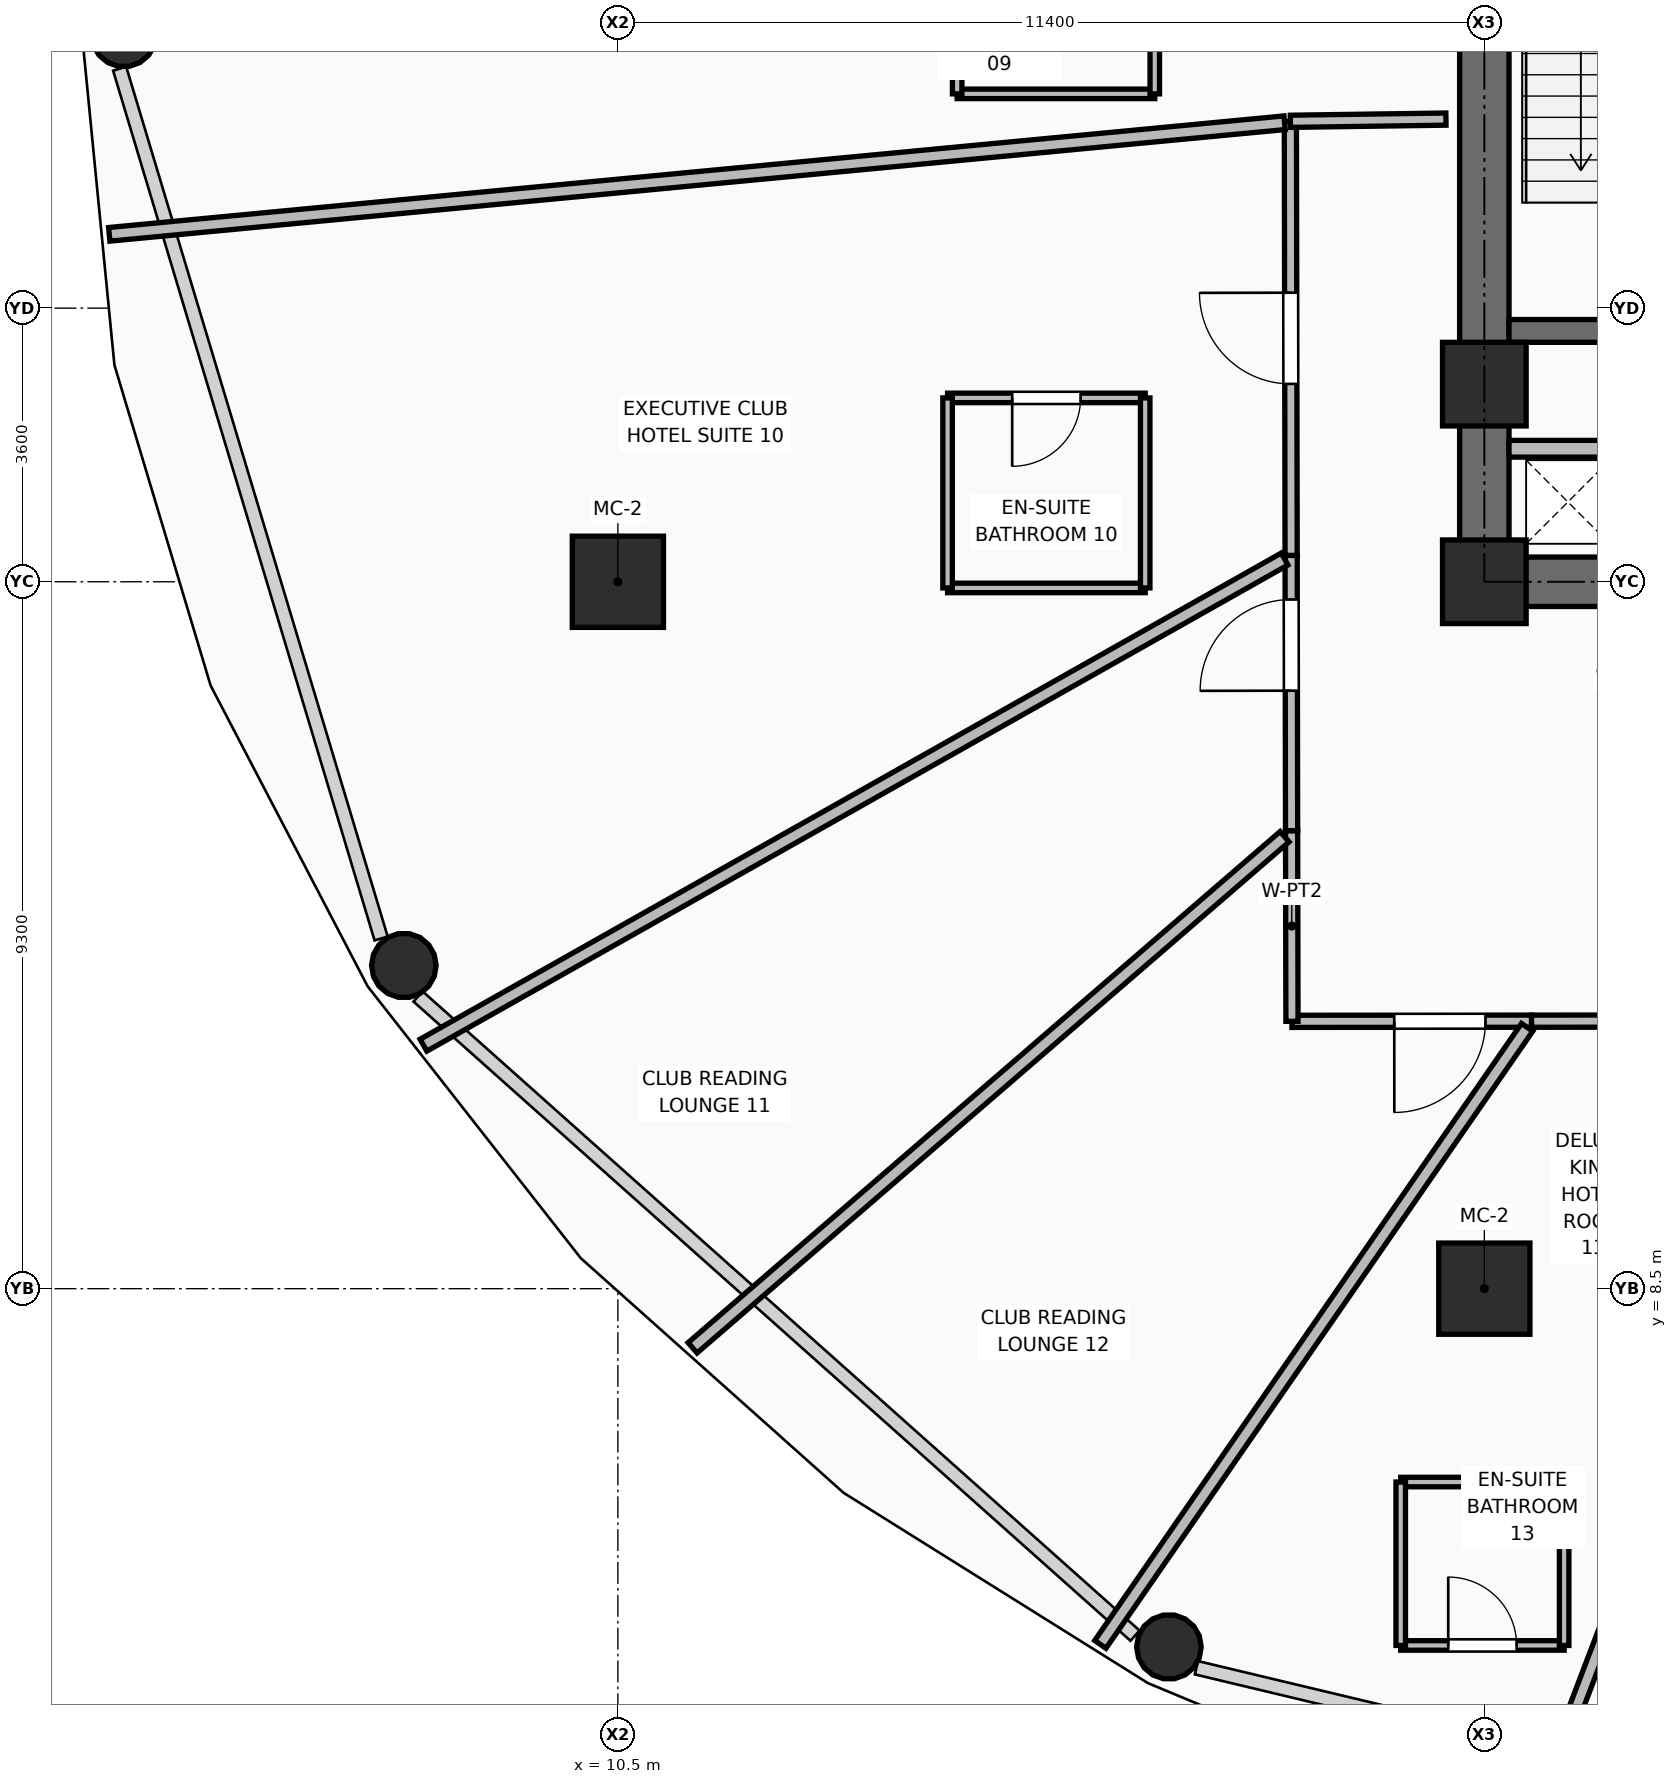
"""IFC4 building model, lengths in metres.
Left out: names, types, materials, properties, quantities, classifications, styles, units other than length and angle.
Written with IfcOpenShell. Run it as: python <this file> out.ifc"""

import sys

from ifc_helpers import new_model, si_unit, direction, frame, frame_2d, origin, origin_2d, place, context, subcontext, project, spatial, rectangle, hollow_rectangle, hollow_circle, extrude, element, fill, save


model = new_model("IFC4")
c1 = context("Model", 3, precision=1e-05, world=origin(), true_north=direction((0.0, 1.0)))
c2 = subcontext(c1, "Body", "Model", "MODEL_VIEW")
j1 = project(units=[si_unit("LENGTHUNIT", "METRE"), si_unit("PLANEANGLEUNIT", "RADIAN")], contexts=[c1])
p1 = place(None, origin())
s1 = spatial("IfcSite", under=j1, at=p1, CompositionType="ELEMENT")
p2 = place(p1, origin())
s2 = spatial("IfcBuilding", under=s1, at=p2, CompositionType="ELEMENT")
p3 = place(p2, frame((0.0, 0.0, 79.5)))
s3 = spatial("IfcBuildingStorey", under=s2, at=p3, CompositionType="ELEMENT", Elevation=79.5)
for number, where, z_axis, x_axis in (
    (1, (21.9, 17.8, 0.0), (0.0, 0.0, 1.0), (1.0, 0.0, 0.0)),
    (2, (21.9, 20.4, 0.0), (0.0, 0.0, 1.0), (1.0, 0.0, 0.0)),
):
    element("IfcColumn", number, at=place(p3, frame(where, z_axis=z_axis, x_axis=x_axis)), inside=s3, PredefinedType="COLUMN", context=c2, shape_type="SweptSolid", body=[
        extrude(rectangle(XDim=1.1, YDim=1.1, at=origin_2d()), origin(), (0.0, 0.0, 1.0), 3.75),
    ])
for number, where, z_axis, x_axis in (
    (3, (21.9, 8.5, 0.0), (0.0, 0.0, 1.0), (1.0, 0.0, 0.0)),
    (4, (10.5, 17.8, 0.0), (0.0, 0.0, 1.0), (1.0, 0.0, 0.0)),
):
    element("IfcColumn", number, at=place(p3, frame(where, z_axis=z_axis, x_axis=x_axis)), inside=s3, PredefinedType="COLUMN", context=c2, shape_type="SweptSolid", body=[
        extrude(hollow_rectangle(XDim=1.2, YDim=1.2, WallThickness=0.045, at=origin_2d()), origin(), (0.0, 0.0, 1.0), 3.75),
    ])
for number, where, z_axis, x_axis in (
    (5, (4.0, 25.0, 0.0), (0.0, 0.0, 1.0), (1.0, 0.0, 0.0)),
    (6, (7.684, 12.752, 0.0), (0.0, 0.0, 1.0), (1.0, 0.0, 0.0)),
    (7, (17.75, 3.787, 0.0), (0.0, 0.0, 1.0), (1.0, 0.0, 0.0)),
):
    element("IfcColumn", number, at=place(p3, frame(where, z_axis=z_axis, x_axis=x_axis)), inside=s3, PredefinedType="COLUMN", context=c2, shape_type="SweptSolid", body=[
        extrude(hollow_circle(Radius=0.425, WallThickness=0.04, at=origin_2d()), origin(), (0.0, 0.0, 1.0), 3.57),
    ])
p4 = place(p3, frame((21.575, 17.8, 0.0), z_axis=(0.0, 0.0, 1.0), x_axis=(1.0, 0.0, 0.0)))
e8 = element("IfcWall", 8, at=p4, inside=s3, PredefinedType="SHEAR", context=c2, shape_type="SweptSolid", body=[
    extrude(rectangle(XDim=2.175, YDim=0.65, at=frame_2d((1.087, 0.0))), origin(), (0.0, 0.0, 1.0), 3.57),
])
p5 = place(p3, frame((21.9, 18.125, 0.0), z_axis=(0.0, 0.0, 1.0), x_axis=(0.0, 1.0, 0.0)))
e9 = element("IfcWall", 9, at=p5, inside=s3, PredefinedType="SHEAR", context=c2, shape_type="SweptSolid", body=[
    extrude(rectangle(XDim=14.0, YDim=0.65, at=frame_2d((7.0, 0.0))), origin(), (0.0, 0.0, 1.0), 3.57),
])
p6 = place(p3, frame((22.225, 21.1, 0.0), z_axis=(0.0, 0.0, 1.0), x_axis=(1.0, 0.0, 0.0)))
e10 = element("IfcWall", 10, at=p6, inside=s3, PredefinedType="SHEAR", context=c2, shape_type="SweptSolid", body=[
    extrude(rectangle(XDim=3.515, YDim=0.3, at=frame_2d((1.757, 0.0))), origin(), (0.0, 0.0, 1.0), 3.57),
])
p7 = place(p6, frame((1.995, 0.0, 0.0)))
e11 = element("IfcOpeningElement", 11, at=p7, cuts=e10, PredefinedType="OPENING", context=c2, shape_type="SweptSolid", body=[
    extrude(rectangle(XDim=1.05, YDim=2.1, at=frame_2d((0.525, 1.05))), frame((0.0, 0.16, 0.0), z_axis=(0.0, -1.0, 0.0), x_axis=(1.0, 0.0, 0.0)), (0.0, 0.0, 1.0), 0.32),
])
p8 = place(p3, frame((22.225, 19.55, 0.0), z_axis=(0.0, 0.0, 1.0), x_axis=(1.0, 0.0, 0.0)))
e12 = element("IfcWall", 12, at=p8, inside=s3, PredefinedType="PARTITIONING", context=c2, shape_type="SweptSolid", body=[
    extrude(rectangle(XDim=1.565, YDim=0.22, at=frame_2d((0.782, 0.0))), origin(), (0.0, 0.0, 1.0), 2.595),
])
p9 = place(p3, frame((26.552, 12.022, 0.0), z_axis=(0.0, 0.0, 1.0), x_axis=(-0.999999736017, -0.000726611979, 0.0)))
e13 = element("IfcWall", 13, at=p9, inside=s3, PredefinedType="PARTITIONING", context=c2, shape_type="SweptSolid", body=[
    extrude(rectangle(XDim=4.032, YDim=0.16, at=frame_2d((2.016, 0.0))), origin(), (0.0, 0.0, 1.0), 3.55),
])
p10 = place(p9, frame((1.587, 0.0, 0.0)))
e14 = element("IfcOpeningElement", 14, at=p10, cuts=e13, PredefinedType="OPENING", context=c2, shape_type="SweptSolid", body=[
    extrude(rectangle(XDim=1.0, YDim=2.1, at=frame_2d((0.5, 1.05))), frame((0.0, 0.09, 0.0), z_axis=(0.0, -1.0, 0.0), x_axis=(1.0, 0.0, 0.0)), (0.0, 0.0, 1.0), 0.18),
])
p11 = place(p3, frame((22.52, 12.019, 0.0), z_axis=(0.0, 0.0, 1.0), x_axis=(-0.999999807912, -0.000619818584, 0.0)))
e15 = element("IfcWall", 15, at=p11, inside=s3, PredefinedType="PARTITIONING", context=c2, shape_type="SweptSolid", body=[
    extrude(rectangle(XDim=3.151, YDim=0.16, at=frame_2d((1.576, 0.0))), origin(), (0.0, 0.0, 1.0), 2.928),
])
p12 = place(p11, frame((0.605, 0.0, 0.0)))
e16 = element("IfcOpeningElement", 16, at=p12, cuts=e15, PredefinedType="OPENING", context=c2, shape_type="SweptSolid", body=[
    extrude(rectangle(XDim=1.2, YDim=2.1, at=frame_2d((0.6, 1.05))), frame((0.0, 0.09, 0.0), z_axis=(0.0, -1.0, 0.0), x_axis=(1.0, 0.0, 0.0)), (0.0, 0.0, 1.0), 0.18),
])
p13 = place(p3, frame((19.369, 12.017, 0.0), z_axis=(0.0, 0.0, 1.0), x_axis=(-0.001947036808, 0.999998104522, 0.0)))
e17 = element("IfcWall", 17, at=p13, inside=s3, PredefinedType="PARTITIONING", context=c2, shape_type="SweptSolid", body=[
    extrude(rectangle(XDim=2.508, YDim=0.16, at=frame_2d((1.254, 0.0))), origin(), (0.0, 0.0, 1.0), 3.55),
])
p14 = place(p3, frame((19.364, 14.525, 0.0), z_axis=(0.0, 0.0, 1.0), x_axis=(-0.001685087928, 0.999998580238, 0.0)))
e18 = element("IfcWall", 18, at=p14, inside=s3, PredefinedType="PARTITIONING", context=c2, shape_type="SweptSolid", body=[
    extrude(rectangle(XDim=3.622, YDim=0.16, at=frame_2d((1.811, 0.0))), origin(), (0.0, 0.0, 1.0), 2.928),
])
p15 = place(p14, frame((1.842, 0.0, 0.0)))
e19 = element("IfcOpeningElement", 19, at=p15, cuts=e18, PredefinedType="OPENING", context=c2, shape_type="SweptSolid", body=[
    extrude(rectangle(XDim=1.2, YDim=2.1, at=frame_2d((0.6, 1.05))), frame((0.0, 0.09, 0.0), z_axis=(0.0, -1.0, 0.0), x_axis=(1.0, 0.0, 0.0)), (0.0, 0.0, 1.0), 0.18),
])
p16 = place(p3, frame((19.358, 18.147, 0.0), z_axis=(0.0, 0.0, 1.0), x_axis=(-0.001752733286, 0.999998463962, 0.0)))
e20 = element("IfcWall", 20, at=p16, inside=s3, PredefinedType="PARTITIONING", context=c2, shape_type="SweptSolid", body=[
    extrude(rectangle(XDim=5.711, YDim=0.16, at=frame_2d((2.855, 0.0))), origin(), (0.0, 0.0, 1.0), 2.928),
])
p17 = place(p16, frame((2.256, 0.0, 0.0)))
e21 = element("IfcOpeningElement", 21, at=p17, cuts=e20, PredefinedType="OPENING", context=c2, shape_type="SweptSolid", body=[
    extrude(rectangle(XDim=1.2, YDim=2.1, at=frame_2d((0.6, 1.05))), frame((0.0, 0.09, 0.0), z_axis=(0.0, -1.0, 0.0), x_axis=(1.0, 0.0, 0.0)), (0.0, 0.0, 1.0), 0.18),
])
p18 = place(p3, frame((19.348, 23.858, 0.0), z_axis=(0.0, 0.0, 1.0), x_axis=(0.999899308643, 0.014190580528, 0.0)))
e22 = element("IfcWall", 22, at=p18, inside=s3, PredefinedType="PARTITIONING", context=c2, shape_type="SweptSolid", body=[
    extrude(rectangle(XDim=2.047, YDim=0.16, at=frame_2d((1.024, 0.0))), origin(), (0.0, 0.0, 1.0), 3.55),
])
p19 = place(p3, frame((19.272, 23.839, 0.0), z_axis=(0.0, 0.0, 1.0), x_axis=(-0.995524176843, -0.094507213062, 0.0)))
e23 = element("IfcWall", 23, at=p19, inside=s3, PredefinedType="PARTITIONING", context=c2, shape_type="SweptSolid", body=[
    extrude(rectangle(XDim=15.533, YDim=0.18, at=frame_2d((7.767, 0.0))), origin(), (0.0, 0.0, 1.0), 2.775),
])
p20 = place(p3, frame((19.272, 18.099, 0.0), z_axis=(0.0, 0.0, 1.0), x_axis=(-0.870816794363, -0.491607679614, 0.0)))
e24 = element("IfcWall", 24, at=p20, inside=s3, PredefinedType="PARTITIONING", context=c2, shape_type="SweptSolid", body=[
    extrude(rectangle(XDim=13.011, YDim=0.18, at=frame_2d((6.505, 0.0))), origin(), (0.0, 0.0, 1.0), 2.775),
])
p21 = place(p3, frame((19.272, 14.446, 0.0), z_axis=(0.0, 0.0, 1.0), x_axis=(-0.756957430289, -0.653464190855, 0.0)))
e25 = element("IfcWall", 25, at=p21, inside=s3, PredefinedType="PARTITIONING", context=c2, shape_type="SweptSolid", body=[
    extrude(rectangle(XDim=10.29, YDim=0.18, at=frame_2d((5.145, 0.0))), origin(), (0.0, 0.0, 1.0), 2.775),
])
p22 = place(p3, frame((22.463, 11.938, 0.0), z_axis=(0.0, 0.0, 1.0), x_axis=(-0.568860087872, -0.822434313746, 0.0)))
e26 = element("IfcWall", 26, at=p22, inside=s3, PredefinedType="PARTITIONING", context=c2, shape_type="SweptSolid", body=[
    extrude(rectangle(XDim=9.871, YDim=0.18, at=frame_2d((4.935, 0.0))), origin(), (0.0, 0.0, 1.0), 2.775),
])
p23 = place(p3, frame((26.52, 11.938, 0.0), z_axis=(0.0, 0.0, 1.0), x_axis=(-0.356180272112, -0.934417258915, 0.0)))
e27 = element("IfcWall", 27, at=p23, inside=s3, PredefinedType="PARTITIONING", context=c2, shape_type="SweptSolid", body=[
    extrude(rectangle(XDim=11.253, YDim=0.18, at=frame_2d((5.626, 0.0))), origin(), (0.0, 0.0, 1.0), 2.775),
])
p24 = place(p3, frame((14.964, 24.219, 0.0), z_axis=(0.0, 0.0, 1.0), x_axis=(1.0, 0.0, 0.0)))
e28 = element("IfcWall", 28, at=p24, inside=s3, PredefinedType="PARTITIONING", context=c2, shape_type="SweptSolid", body=[
    extrude(rectangle(XDim=2.6, YDim=0.125, at=frame_2d((1.3, 0.0))), origin(), (0.0, 0.0, 1.0), 3.55),
])
p25 = place(p3, frame((14.964, 24.219, 0.0), z_axis=(0.0, 0.0, 1.0), x_axis=(0.0, 1.0, 0.0)))
e29 = element("IfcWall", 29, at=p25, inside=s3, PredefinedType="PARTITIONING", context=c2, shape_type="SweptSolid", body=[
    extrude(rectangle(XDim=2.5, YDim=0.125, at=frame_2d((1.25, 0.0))), origin(), (0.0, 0.0, 1.0), 3.55),
])
p26 = place(p3, frame((17.564, 24.219, 0.0), z_axis=(0.0, 0.0, 1.0), x_axis=(0.0, 1.0, 0.0)))
e30 = element("IfcWall", 30, at=p26, inside=s3, PredefinedType="PARTITIONING", context=c2, shape_type="SweptSolid", body=[
    extrude(rectangle(XDim=2.5, YDim=0.125, at=frame_2d((1.25, 0.0))), origin(), (0.0, 0.0, 1.0), 3.55),
])
p27 = place(p26, frame((0.8, 0.0, 0.0)))
e31 = element("IfcOpeningElement", 31, at=p27, cuts=e30, PredefinedType="OPENING", context=c2, shape_type="SweptSolid", body=[
    extrude(rectangle(XDim=0.9, YDim=2.1, at=frame_2d((0.45, 1.05))), frame((0.0, 0.073, 0.0), z_axis=(0.0, -1.0, 0.0), x_axis=(1.0, 0.0, 0.0)), (0.0, 0.0, 1.0), 0.145),
])
p28 = place(p3, frame((14.838, 17.719, 0.0), z_axis=(0.0, 0.0, 1.0), x_axis=(1.0, 0.0, 0.0)))
e32 = element("IfcWall", 32, at=p28, inside=s3, PredefinedType="PARTITIONING", context=c2, shape_type="SweptSolid", body=[
    extrude(rectangle(XDim=2.6, YDim=0.125, at=frame_2d((1.3, 0.0))), origin(), (0.0, 0.0, 1.0), 3.55),
])
p29 = place(p3, frame((14.838, 20.219, 0.0), z_axis=(0.0, 0.0, 1.0), x_axis=(1.0, 0.0, 0.0)))
e33 = element("IfcWall", 33, at=p29, inside=s3, PredefinedType="PARTITIONING", context=c2, shape_type="SweptSolid", body=[
    extrude(rectangle(XDim=2.6, YDim=0.125, at=frame_2d((1.3, 0.0))), origin(), (0.0, 0.0, 1.0), 3.55),
])
p30 = place(p29, frame((0.85, 0.0, 0.0)))
e34 = element("IfcOpeningElement", 34, at=p30, cuts=e33, PredefinedType="OPENING", context=c2, shape_type="SweptSolid", body=[
    extrude(rectangle(XDim=0.9, YDim=2.1, at=frame_2d((0.45, 1.05))), frame((0.0, 0.073, 0.0), z_axis=(0.0, -1.0, 0.0), x_axis=(1.0, 0.0, 0.0)), (0.0, 0.0, 1.0), 0.145),
])
for number, where, z_axis, x_axis in (
    (35, (14.838, 17.719, 0.0), (0.0, 0.0, 1.0), (0.0, 1.0, 0.0)),
    (36, (17.438, 17.719, 0.0), (0.0, 0.0, 1.0), (0.0, 1.0, 0.0)),
):
    element("IfcWall", number, at=place(p3, frame(where, z_axis=z_axis, x_axis=x_axis)), inside=s3, PredefinedType="PARTITIONING", context=c2, shape_type="SweptSolid", body=[
        extrude(rectangle(XDim=2.5, YDim=0.125, at=frame_2d((1.25, 0.0))), origin(), (0.0, 0.0, 1.0), 3.55),
    ])
p31 = place(p3, frame((20.8, 3.806, 0.0), z_axis=(0.0, 0.0, 1.0), x_axis=(1.0, 0.0, 0.0)))
e37 = element("IfcWall", 37, at=p31, inside=s3, PredefinedType="PARTITIONING", context=c2, shape_type="SweptSolid", body=[
    extrude(rectangle(XDim=2.15, YDim=0.125, at=frame_2d((1.075, 0.0))), origin(), (0.0, 0.0, 1.0), 3.55),
])
p32 = place(p31, frame((0.625, 0.0, 0.0)))
e38 = element("IfcOpeningElement", 38, at=p32, cuts=e37, PredefinedType="OPENING", context=c2, shape_type="SweptSolid", body=[
    extrude(rectangle(XDim=0.9, YDim=2.1, at=frame_2d((0.45, 1.05))), frame((0.0, 0.073, 0.0), z_axis=(0.0, -1.0, 0.0), x_axis=(1.0, 0.0, 0.0)), (0.0, 0.0, 1.0), 0.145),
])
p33 = place(p3, frame((20.8, 5.956, 0.0), z_axis=(0.0, 0.0, 1.0), x_axis=(1.0, 0.0, 0.0)))
e39 = element("IfcWall", 39, at=p33, inside=s3, PredefinedType="PARTITIONING", context=c2, shape_type="SweptSolid", body=[
    extrude(rectangle(XDim=2.15, YDim=0.125, at=frame_2d((1.075, 0.0))), origin(), (0.0, 0.0, 1.0), 3.55),
])
for number, where, z_axis, x_axis in (
    (40, (20.8, 3.806, 0.0), (0.0, 0.0, 1.0), (0.0, 1.0, 0.0)),
    (41, (22.95, 3.806, 0.0), (0.0, 0.0, 1.0), (0.0, 1.0, 0.0)),
):
    element("IfcWall", number, at=place(p3, frame(where, z_axis=z_axis, x_axis=x_axis)), inside=s3, PredefinedType="PARTITIONING", context=c2, shape_type="SweptSolid", body=[
        extrude(rectangle(XDim=2.15, YDim=0.125, at=frame_2d((1.075, 0.0))), origin(), (0.0, 0.0, 1.0), 3.55),
    ])
p34 = place(p30, frame((0.9, 0.0, 0.0), z_axis=(0.0, 0.0, 1.0), x_axis=(-1.0, 0.0, 0.0)))
e42 = element("IfcDoor", 42, at=p34, inside=s3, OperationType="SINGLE_SWING_RIGHT", PredefinedType="DOOR", context=c2, shape_type="SweptSolid", body=[
    extrude(rectangle(XDim=0.9, YDim=2.1, at=frame_2d((0.45, 1.05))), frame((0.0, 0.025, 0.0), z_axis=(0.0, -1.0, 0.0), x_axis=(1.0, 0.0, 0.0)), (0.0, 0.0, 1.0), 0.05),
])
fill(e34, e42)
p35 = place(p17, origin())
e43 = element("IfcDoor", 43, at=p35, inside=s3, OperationType="SINGLE_SWING_RIGHT", PredefinedType="DOOR", context=c2, shape_type="SweptSolid", body=[
    extrude(rectangle(XDim=1.2, YDim=2.1, at=frame_2d((0.6, 1.05))), frame((0.0, 0.025, 0.0), z_axis=(0.0, -1.0, 0.0), x_axis=(1.0, 0.0, 0.0)), (0.0, 0.0, 1.0), 0.05),
])
fill(e21, e43)
p36 = place(p15, origin())
e44 = element("IfcDoor", 44, at=p36, inside=s3, OperationType="SINGLE_SWING_LEFT", PredefinedType="DOOR", context=c2, shape_type="SweptSolid", body=[
    extrude(rectangle(XDim=1.2, YDim=2.1, at=frame_2d((0.6, 1.05))), frame((0.0, 0.025, 0.0), z_axis=(0.0, -1.0, 0.0), x_axis=(1.0, 0.0, 0.0)), (0.0, 0.0, 1.0), 0.05),
])
fill(e19, e44)
p37 = place(p12, origin())
e45 = element("IfcDoor", 45, at=p37, inside=s3, OperationType="SINGLE_SWING_RIGHT", PredefinedType="DOOR", context=c2, shape_type="SweptSolid", body=[
    extrude(rectangle(XDim=1.2, YDim=2.1, at=frame_2d((0.6, 1.05))), frame((0.0, 0.025, 0.0), z_axis=(0.0, -1.0, 0.0), x_axis=(1.0, 0.0, 0.0)), (0.0, 0.0, 1.0), 0.05),
])
fill(e16, e45)
p38 = place(p32, origin())
e46 = element("IfcDoor", 46, at=p38, inside=s3, OperationType="SINGLE_SWING_LEFT", PredefinedType="DOOR", context=c2, shape_type="SweptSolid", body=[
    extrude(rectangle(XDim=0.9, YDim=2.1, at=frame_2d((0.45, 1.05))), frame((0.0, 0.025, 0.0), z_axis=(0.0, -1.0, 0.0), x_axis=(1.0, 0.0, 0.0)), (0.0, 0.0, 1.0), 0.05),
])
fill(e38, e46)
save(model, sys.argv[1])
